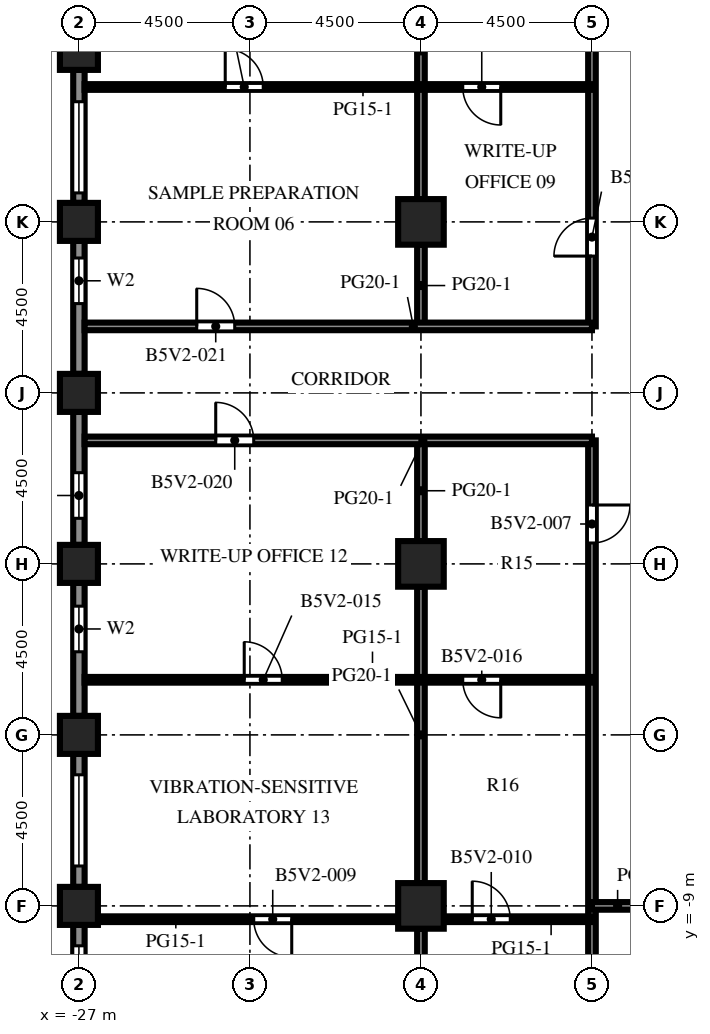
"""IFC4 building model, lengths in metres.
Left out: names, types, materials, properties, quantities, classifications, styles, units other than length and angle.
Written with IfcOpenShell. Run it as: python <this file> out.ifc"""

import sys

from ifc_helpers import new_model, si_unit, direction, frame, frame_2d, origin, origin_2d, place, context, subcontext, project, spatial, rectangle, extrude, element, fill, save


model = new_model("IFC4")
c1 = context("Model", 3, precision=1e-05, world=origin(), true_north=direction((0.0, 1.0)))
c2 = subcontext(c1, "Body", "Model", "MODEL_VIEW")
j1 = project(units=[si_unit("LENGTHUNIT", "METRE"), si_unit("PLANEANGLEUNIT", "RADIAN")], contexts=[c1])
p1 = place(None, origin())
s1 = spatial("IfcSite", under=j1, at=p1, CompositionType="ELEMENT")
p2 = place(p1, origin())
s2 = spatial("IfcBuilding", under=s1, at=p2, CompositionType="ELEMENT")
p3 = place(p2, frame((0.0, 0.0, 177.3)))
s3 = spatial("IfcBuildingStorey", under=s2, at=p3, CompositionType="ELEMENT", Elevation=177.3)
for number, where, z_axis, x_axis in (
    (1, (-27.0, -9.0, 0.0), (0.0, 0.0, 1.0), (1.0, 0.0, 0.0)),
    (2, (-27.0, -4.5, 0.0), (0.0, 0.0, 1.0), (1.0, 0.0, 0.0)),
    (3, (-27.0, 0.0, 0.0), (0.0, 0.0, 1.0), (1.0, 0.0, 0.0)),
    (4, (-27.0, 4.5, 0.0), (0.0, 0.0, 1.0), (1.0, 0.0, 0.0)),
    (5, (-27.0, 9.0, 0.0), (0.0, 0.0, 1.0), (1.0, 0.0, 0.0)),
    (6, (-27.0, 13.5, 0.0), (0.0, 0.0, 1.0), (1.0, 0.0, 0.0)),
):
    element("IfcColumn", number, at=place(p3, frame(where, z_axis=z_axis, x_axis=x_axis)), inside=s3, PredefinedType="COLUMN", context=c2, shape_type="SweptSolid", body=[
        extrude(rectangle(XDim=1.0, YDim=1.0, at=origin_2d()), origin(), (0.0, 0.0, 1.0), 4.1),
    ])
for number, where, z_axis, x_axis in (
    (7, (-18.0, -9.0, 0.0), (0.0, 0.0, 1.0), (1.0, 0.0, 0.0)),
    (8, (-18.0, 0.0, 0.0), (0.0, 0.0, 1.0), (1.0, 0.0, 0.0)),
    (9, (-18.0, 9.0, 0.0), (0.0, 0.0, 1.0), (1.0, 0.0, 0.0)),
):
    element("IfcColumn", number, at=place(p3, frame(where, z_axis=z_axis, x_axis=x_axis)), inside=s3, PredefinedType="COLUMN", context=c2, shape_type="SweptSolid", body=[
        extrude(rectangle(XDim=1.2, YDim=1.2, at=origin_2d()), origin(), (0.0, 0.0, 1.0), 4.1),
    ])
p4 = place(p3, frame((-27.0, 9.5, 0.0), z_axis=(0.0, 0.0, 1.0), x_axis=(0.0, 1.0, 0.0)))
e10 = element("IfcWall", 10, at=p4, inside=s3, PredefinedType="SOLIDWALL", context=c2, shape_type="SweptSolid", body=[
    extrude(rectangle(XDim=3.5, YDim=0.3, at=frame_2d((1.75, 0.0))), origin(), (0.0, 0.0, 1.0), 2.85),
])
p5 = place(p4, frame((0.262, 0.0, 0.8)))
e11 = element("IfcOpeningElement", 11, at=p5, cuts=e10, PredefinedType="OPENING", context=c2, shape_type="SweptSolid", body=[
    extrude(rectangle(XDim=2.4, YDim=1.7, at=frame_2d((1.2, 0.85))), frame((0.0, 0.16, 0.0), z_axis=(0.0, -1.0, 0.0), x_axis=(1.0, 0.0, 0.0)), (0.0, 0.0, 1.0), 0.32),
])
p6 = place(p3, frame((-27.0, 5.0, 0.0), z_axis=(0.0, 0.0, 1.0), x_axis=(0.0, 1.0, 0.0)))
e12 = element("IfcWall", 12, at=p6, inside=s3, PredefinedType="SOLIDWALL", context=c2, shape_type="SweptSolid", body=[
    extrude(rectangle(XDim=3.5, YDim=0.3, at=frame_2d((1.75, 0.0))), origin(), (0.0, 0.0, 1.0), 2.85),
])
p7 = place(p6, frame((1.85, 0.0, 0.8)))
e13 = element("IfcOpeningElement", 13, at=p7, cuts=e12, PredefinedType="OPENING", context=c2, shape_type="SweptSolid", body=[
    extrude(rectangle(XDim=1.2, YDim=1.7, at=frame_2d((0.6, 0.85))), frame((0.0, 0.16, 0.0), z_axis=(0.0, -1.0, 0.0), x_axis=(1.0, 0.0, 0.0)), (0.0, 0.0, 1.0), 0.32),
])
p8 = place(p3, frame((-27.0, 0.5, 0.0), z_axis=(0.0, 0.0, 1.0), x_axis=(0.0, 1.0, 0.0)))
e14 = element("IfcWall", 14, at=p8, inside=s3, PredefinedType="SOLIDWALL", context=c2, shape_type="SweptSolid", body=[
    extrude(rectangle(XDim=3.5, YDim=0.3, at=frame_2d((1.75, 0.0))), origin(), (0.0, 0.0, 1.0), 2.85),
])
p9 = place(p8, frame((0.7, 0.0, 0.8)))
e15 = element("IfcOpeningElement", 15, at=p9, cuts=e14, PredefinedType="OPENING", context=c2, shape_type="SweptSolid", body=[
    extrude(rectangle(XDim=1.2, YDim=1.7, at=frame_2d((0.6, 0.85))), frame((0.0, 0.16, 0.0), z_axis=(0.0, -1.0, 0.0), x_axis=(1.0, 0.0, 0.0)), (0.0, 0.0, 1.0), 0.32),
])
p10 = place(p3, frame((-27.0, -4.0, 0.0), z_axis=(0.0, 0.0, 1.0), x_axis=(0.0, 1.0, 0.0)))
e16 = element("IfcWall", 16, at=p10, inside=s3, PredefinedType="SOLIDWALL", context=c2, shape_type="SweptSolid", body=[
    extrude(rectangle(XDim=3.5, YDim=0.3, at=frame_2d((1.75, 0.0))), origin(), (0.0, 0.0, 1.0), 2.85),
])
p11 = place(p10, frame((1.688, 0.0, 0.8)))
e17 = element("IfcOpeningElement", 17, at=p11, cuts=e16, PredefinedType="OPENING", context=c2, shape_type="SweptSolid", body=[
    extrude(rectangle(XDim=1.2, YDim=1.7, at=frame_2d((0.6, 0.85))), frame((0.0, 0.16, 0.0), z_axis=(0.0, -1.0, 0.0), x_axis=(1.0, 0.0, 0.0)), (0.0, 0.0, 1.0), 0.32),
])
p12 = place(p3, frame((-27.0, -8.5, 0.0), z_axis=(0.0, 0.0, 1.0), x_axis=(0.0, 1.0, 0.0)))
e18 = element("IfcWall", 18, at=p12, inside=s3, PredefinedType="SOLIDWALL", context=c2, shape_type="SweptSolid", body=[
    extrude(rectangle(XDim=3.5, YDim=0.3, at=frame_2d((1.75, 0.0))), origin(), (0.0, 0.0, 1.0), 2.85),
])
p13 = place(p12, frame((0.55, 0.0, 0.8)))
e19 = element("IfcOpeningElement", 19, at=p13, cuts=e18, PredefinedType="OPENING", context=c2, shape_type="SweptSolid", body=[
    extrude(rectangle(XDim=2.4, YDim=1.7, at=frame_2d((1.2, 0.85))), frame((0.0, 0.16, 0.0), z_axis=(0.0, -1.0, 0.0), x_axis=(1.0, 0.0, 0.0)), (0.0, 0.0, 1.0), 0.32),
])
p14 = place(p3, frame((-27.0, -13.0, 0.0), z_axis=(0.0, 0.0, 1.0), x_axis=(0.0, 1.0, 0.0)))
e20 = element("IfcWall", 20, at=p14, inside=s3, PredefinedType="SOLIDWALL", context=c2, shape_type="SweptSolid", body=[
    extrude(rectangle(XDim=3.5, YDim=0.3, at=frame_2d((1.75, 0.0))), origin(), (0.0, 0.0, 1.0), 2.85),
])
p15 = place(p14, frame((0.55, 0.0, 0.8)))
e21 = element("IfcOpeningElement", 21, at=p15, cuts=e20, PredefinedType="OPENING", context=c2, shape_type="SweptSolid", body=[
    extrude(rectangle(XDim=2.4, YDim=1.7, at=frame_2d((1.2, 0.85))), frame((0.0, 0.16, 0.0), z_axis=(0.0, -1.0, 0.0), x_axis=(1.0, 0.0, 0.0)), (0.0, 0.0, 1.0), 0.32),
])
for number, where, z_axis, x_axis in (
    (22, (-18.0, -17.4, 0.0), (0.0, 0.0, 1.0), (0.0, 1.0, 0.0)),
    (23, (-18.0, -8.4, 0.0), (0.0, 0.0, 1.0), (0.0, 1.0, 0.0)),
):
    element("IfcWall", number, at=place(p3, frame(where, z_axis=z_axis, x_axis=x_axis)), inside=s3, PredefinedType="PARTITIONING", context=c2, shape_type="SweptSolid", body=[
        extrude(rectangle(XDim=7.8, YDim=0.2, at=frame_2d((3.9, 0.0))), origin(), (0.0, 0.0, 1.0), 3.65),
    ])
p16 = place(p3, frame((-18.0, 0.6, 0.0), z_axis=(0.0, 0.0, 1.0), x_axis=(0.0, 1.0, 0.0)))
e24 = element("IfcWall", 24, at=p16, inside=s3, PredefinedType="PARTITIONING", context=c2, shape_type="SweptSolid", body=[
    extrude(rectangle(XDim=2.65, YDim=0.2, at=frame_2d((1.325, 0.0))), origin(), (0.0, 0.0, 1.0), 3.65),
])
p17 = place(p3, frame((-18.0, 6.25, 0.0), z_axis=(0.0, 0.0, 1.0), x_axis=(0.0, 1.0, 0.0)))
e25 = element("IfcWall", 25, at=p17, inside=s3, PredefinedType="PARTITIONING", context=c2, shape_type="SweptSolid", body=[
    extrude(rectangle(XDim=2.15, YDim=0.2, at=frame_2d((1.075, 0.0))), origin(), (0.0, 0.0, 1.0), 3.65),
])
p18 = place(p3, frame((-18.0, 9.6, 0.0), z_axis=(0.0, 0.0, 1.0), x_axis=(0.0, 1.0, 0.0)))
e26 = element("IfcWall", 26, at=p18, inside=s3, PredefinedType="PARTITIONING", context=c2, shape_type="SweptSolid", body=[
    extrude(rectangle(XDim=7.8, YDim=0.2, at=frame_2d((3.9, 0.0))), origin(), (0.0, 0.0, 1.0), 3.65),
])
p19 = place(p3, frame((-13.5, -26.5, 0.0), z_axis=(0.0, 0.0, 1.0), x_axis=(0.0, 1.0, 0.0)))
e27 = element("IfcWall", 27, at=p19, inside=s3, PredefinedType="PARTITIONING", context=c2, shape_type="SweptSolid", body=[
    extrude(rectangle(XDim=29.75, YDim=0.2, at=frame_2d((14.875, 0.0))), origin(), (0.0, 0.0, 1.0), 3.65),
])
p20 = place(p19, frame((27.05, 0.0, 0.0)))
e28 = element("IfcOpeningElement", 28, at=p20, cuts=e27, PredefinedType="OPENING", context=c2, shape_type="SweptSolid", body=[
    extrude(rectangle(XDim=1.0, YDim=2.1, at=frame_2d((0.5, 1.05))), frame((0.0, 0.11, 0.0), z_axis=(0.0, -1.0, 0.0), x_axis=(1.0, 0.0, 0.0)), (0.0, 0.0, 1.0), 0.22),
])
p21 = place(p3, frame((-13.5, 6.25, 0.0), z_axis=(0.0, 0.0, 1.0), x_axis=(0.0, 1.0, 0.0)))
e29 = element("IfcWall", 29, at=p21, inside=s3, PredefinedType="PARTITIONING", context=c2, shape_type="SweptSolid", body=[
    extrude(rectangle(XDim=20.25, YDim=0.2, at=frame_2d((10.125, 0.0))), origin(), (0.0, 0.0, 1.0), 3.65),
])
p22 = place(p21, frame((1.85, 0.0, 0.0)))
e30 = element("IfcOpeningElement", 30, at=p22, cuts=e29, PredefinedType="OPENING", context=c2, shape_type="SweptSolid", body=[
    extrude(rectangle(XDim=1.0, YDim=2.1, at=frame_2d((0.5, 1.05))), frame((0.0, 0.11, 0.0), z_axis=(0.0, -1.0, 0.0), x_axis=(1.0, 0.0, 0.0)), (0.0, 0.0, 1.0), 0.22),
])
p23 = place(p3, frame((-18.6, -9.35, 0.0), z_axis=(0.0, 0.0, 1.0), x_axis=(-1.0, 0.0, 0.0)))
e31 = element("IfcWall", 31, at=p23, inside=s3, PredefinedType="PARTITIONING", context=c2, shape_type="SweptSolid", body=[
    extrude(rectangle(XDim=7.9, YDim=0.15, at=frame_2d((3.95, 0.0))), origin(), (0.0, 0.0, 1.0), 3.65),
])
p24 = place(p23, frame((2.8, 0.0, 0.0)))
e32 = element("IfcOpeningElement", 32, at=p24, cuts=e31, PredefinedType="OPENING", context=c2, shape_type="SweptSolid", body=[
    extrude(rectangle(XDim=1.0, YDim=2.1, at=frame_2d((0.5, 1.05))), frame((0.0, 0.085, 0.0), z_axis=(0.0, -1.0, 0.0), x_axis=(1.0, 0.0, 0.0)), (0.0, 0.0, 1.0), 0.17),
])
p25 = place(p3, frame((-13.5, -9.35, 0.0), z_axis=(0.0, 0.0, 1.0), x_axis=(-1.0, 0.0, 0.0)))
e33 = element("IfcWall", 33, at=p25, inside=s3, PredefinedType="PARTITIONING", context=c2, shape_type="SweptSolid", body=[
    extrude(rectangle(XDim=3.9, YDim=0.15, at=frame_2d((1.95, 0.0))), origin(), (0.0, 0.0, 1.0), 3.65),
])
p26 = place(p25, frame((2.15, 0.0, 0.0)))
e34 = element("IfcOpeningElement", 34, at=p26, cuts=e33, PredefinedType="OPENING", context=c2, shape_type="SweptSolid", body=[
    extrude(rectangle(XDim=1.0, YDim=2.1, at=frame_2d((0.5, 1.05))), frame((0.0, 0.085, 0.0), z_axis=(0.0, -1.0, 0.0), x_axis=(1.0, 0.0, 0.0)), (0.0, 0.0, 1.0), 0.17),
])
p27 = place(p3, frame((-10.5, -9.0, 0.0), z_axis=(0.0, 0.0, 1.0), x_axis=(-1.0, 0.0, 0.0)))
e35 = element("IfcWall", 35, at=p27, inside=s3, PredefinedType="PARTITIONING", context=c2, shape_type="SweptSolid", body=[
    extrude(rectangle(XDim=3.0, YDim=0.2, at=frame_2d((1.5, 0.0))), origin(), (0.0, 0.0, 1.0), 3.65),
])
p28 = place(p27, frame((0.65, 0.0, 0.0)))
e36 = element("IfcOpeningElement", 36, at=p28, cuts=e35, PredefinedType="OPENING", context=c2, shape_type="SweptSolid", body=[
    extrude(rectangle(XDim=1.0, YDim=2.1, at=frame_2d((0.5, 1.05))), frame((0.0, 0.11, 0.0), z_axis=(0.0, -1.0, 0.0), x_axis=(1.0, 0.0, 0.0)), (0.0, 0.0, 1.0), 0.22),
])
p29 = place(p3, frame((-13.5, -3.05, 0.0), z_axis=(0.0, 0.0, 1.0), x_axis=(-1.0, 0.0, 0.0)))
e37 = element("IfcWall", 37, at=p29, inside=s3, PredefinedType="PARTITIONING", context=c2, shape_type="SweptSolid", body=[
    extrude(rectangle(XDim=13.35, YDim=0.15, at=frame_2d((6.675, 0.0))), origin(), (0.0, 0.0, 1.0), 3.65),
])
p30 = place(p29, frame((8.15, 0.0, 0.0)))
e38 = element("IfcOpeningElement", 38, at=p30, cuts=e37, PredefinedType="OPENING", context=c2, shape_type="SweptSolid", body=[
    extrude(rectangle(XDim=1.0, YDim=2.1, at=frame_2d((0.5, 1.05))), frame((0.0, 0.085, 0.0), z_axis=(0.0, -1.0, 0.0), x_axis=(1.0, 0.0, 0.0)), (0.0, 0.0, 1.0), 0.17),
])
p31 = place(p29, frame((2.4, 0.0, 0.0)))
e39 = element("IfcOpeningElement", 39, at=p31, cuts=e37, PredefinedType="OPENING", context=c2, shape_type="SweptSolid", body=[
    extrude(rectangle(XDim=1.0, YDim=2.1, at=frame_2d((0.5, 1.05))), frame((0.0, 0.085, 0.0), z_axis=(0.0, -1.0, 0.0), x_axis=(1.0, 0.0, 0.0)), (0.0, 0.0, 1.0), 0.17),
])
p32 = place(p3, frame((-13.5, 3.25, 0.0), z_axis=(0.0, 0.0, 1.0), x_axis=(-1.0, 0.0, 0.0)))
e40 = element("IfcWall", 40, at=p32, inside=s3, PredefinedType="PARTITIONING", context=c2, shape_type="SweptSolid", body=[
    extrude(rectangle(XDim=13.35, YDim=0.2, at=frame_2d((6.675, 0.0))), origin(), (0.0, 0.0, 1.0), 3.65),
])
p33 = place(p32, frame((8.9, 0.0, 0.0)))
e41 = element("IfcOpeningElement", 41, at=p33, cuts=e40, PredefinedType="OPENING", context=c2, shape_type="SweptSolid", body=[
    extrude(rectangle(XDim=1.0, YDim=2.1, at=frame_2d((0.5, 1.05))), frame((0.0, 0.11, 0.0), z_axis=(0.0, -1.0, 0.0), x_axis=(1.0, 0.0, 0.0)), (0.0, 0.0, 1.0), 0.22),
])
p34 = place(p3, frame((-26.85, 6.25, 0.0), z_axis=(0.0, 0.0, 1.0), x_axis=(1.0, 0.0, 0.0)))
e42 = element("IfcWall", 42, at=p34, inside=s3, PredefinedType="PARTITIONING", context=c2, shape_type="SweptSolid", body=[
    extrude(rectangle(XDim=13.35, YDim=0.2, at=frame_2d((6.675, 0.0))), origin(), (0.0, 0.0, 1.0), 3.65),
])
p35 = place(p34, frame((2.95, 0.0, 0.0)))
e43 = element("IfcOpeningElement", 43, at=p35, cuts=e42, PredefinedType="OPENING", context=c2, shape_type="SweptSolid", body=[
    extrude(rectangle(XDim=1.0, YDim=2.1, at=frame_2d((0.5, 1.05))), frame((0.0, 0.11, 0.0), z_axis=(0.0, -1.0, 0.0), x_axis=(1.0, 0.0, 0.0)), (0.0, 0.0, 1.0), 0.22),
])
p36 = place(p3, frame((-26.85, 12.55, 0.0), z_axis=(0.0, 0.0, 1.0), x_axis=(1.0, 0.0, 0.0)))
e44 = element("IfcWall", 44, at=p36, inside=s3, PredefinedType="PARTITIONING", context=c2, shape_type="SweptSolid", body=[
    extrude(rectangle(XDim=13.35, YDim=0.15, at=frame_2d((6.675, 0.0))), origin(), (0.0, 0.0, 1.0), 3.65),
])
p37 = place(p36, frame((3.7, 0.0, 0.0)))
e45 = element("IfcOpeningElement", 45, at=p37, cuts=e44, PredefinedType="OPENING", context=c2, shape_type="SweptSolid", body=[
    extrude(rectangle(XDim=1.0, YDim=2.1, at=frame_2d((0.5, 1.05))), frame((0.0, 0.085, 0.0), z_axis=(0.0, -1.0, 0.0), x_axis=(1.0, 0.0, 0.0)), (0.0, 0.0, 1.0), 0.17),
])
p38 = place(p36, frame((9.95, 0.0, 0.0)))
e46 = element("IfcOpeningElement", 46, at=p38, cuts=e44, PredefinedType="OPENING", context=c2, shape_type="SweptSolid", body=[
    extrude(rectangle(XDim=1.0, YDim=2.1, at=frame_2d((0.5, 1.05))), frame((0.0, 0.085, 0.0), z_axis=(0.0, -1.0, 0.0), x_axis=(1.0, 0.0, 0.0)), (0.0, 0.0, 1.0), 0.17),
])
p39 = place(p5, origin())
e47 = element("IfcWindow", 47, at=p39, inside=s3, PartitioningType="SINGLE_PANEL", PredefinedType="WINDOW", context=c2, shape_type="SweptSolid", body=[
    extrude(rectangle(XDim=2.4, YDim=1.7, at=frame_2d((1.2, 0.85))), frame((0.0, 0.03, 0.0), z_axis=(0.0, -1.0, 0.0), x_axis=(1.0, 0.0, 0.0)), (0.0, 0.0, 1.0), 0.06),
])
fill(e11, e47)
p40 = place(p7, origin())
e48 = element("IfcWindow", 48, at=p40, inside=s3, PartitioningType="SINGLE_PANEL", PredefinedType="WINDOW", context=c2, shape_type="SweptSolid", body=[
    extrude(rectangle(XDim=1.2, YDim=1.7, at=frame_2d((0.6, 0.85))), frame((0.0, 0.03, 0.0), z_axis=(0.0, -1.0, 0.0), x_axis=(1.0, 0.0, 0.0)), (0.0, 0.0, 1.0), 0.06),
])
fill(e13, e48)
p41 = place(p9, origin())
e49 = element("IfcWindow", 49, at=p41, inside=s3, PartitioningType="SINGLE_PANEL", PredefinedType="WINDOW", context=c2, shape_type="SweptSolid", body=[
    extrude(rectangle(XDim=1.2, YDim=1.7, at=frame_2d((0.6, 0.85))), frame((0.0, 0.03, 0.0), z_axis=(0.0, -1.0, 0.0), x_axis=(1.0, 0.0, 0.0)), (0.0, 0.0, 1.0), 0.06),
])
fill(e15, e49)
p42 = place(p11, origin())
e50 = element("IfcWindow", 50, at=p42, inside=s3, PartitioningType="SINGLE_PANEL", PredefinedType="WINDOW", context=c2, shape_type="SweptSolid", body=[
    extrude(rectangle(XDim=1.2, YDim=1.7, at=frame_2d((0.6, 0.85))), frame((0.0, 0.03, 0.0), z_axis=(0.0, -1.0, 0.0), x_axis=(1.0, 0.0, 0.0)), (0.0, 0.0, 1.0), 0.06),
])
fill(e17, e50)
p43 = place(p13, origin())
e51 = element("IfcWindow", 51, at=p43, inside=s3, PartitioningType="SINGLE_PANEL", PredefinedType="WINDOW", context=c2, shape_type="SweptSolid", body=[
    extrude(rectangle(XDim=2.4, YDim=1.7, at=frame_2d((1.2, 0.85))), frame((0.0, 0.03, 0.0), z_axis=(0.0, -1.0, 0.0), x_axis=(1.0, 0.0, 0.0)), (0.0, 0.0, 1.0), 0.06),
])
fill(e19, e51)
p44 = place(p15, origin())
e52 = element("IfcWindow", 52, at=p44, inside=s3, PartitioningType="SINGLE_PANEL", PredefinedType="WINDOW", context=c2, shape_type="SweptSolid", body=[
    extrude(rectangle(XDim=2.4, YDim=1.7, at=frame_2d((1.2, 0.85))), frame((0.0, 0.03, 0.0), z_axis=(0.0, -1.0, 0.0), x_axis=(1.0, 0.0, 0.0)), (0.0, 0.0, 1.0), 0.06),
])
fill(e21, e52)
p45 = place(p20, origin())
e53 = element("IfcDoor", 53, at=p45, inside=s3, OperationType="SINGLE_SWING_RIGHT", PredefinedType="DOOR", context=c2, shape_type="SweptSolid", body=[
    extrude(rectangle(XDim=1.0, YDim=2.1, at=frame_2d((0.5, 1.05))), frame((0.0, 0.025, 0.0), z_axis=(0.0, -1.0, 0.0), x_axis=(1.0, 0.0, 0.0)), (0.0, 0.0, 1.0), 0.05),
])
fill(e28, e53)
p46 = place(p22, origin())
e54 = element("IfcDoor", 54, at=p46, inside=s3, OperationType="SINGLE_SWING_LEFT", PredefinedType="DOOR", context=c2, shape_type="SweptSolid", body=[
    extrude(rectangle(XDim=1.0, YDim=2.1, at=frame_2d((0.5, 1.05))), frame((0.0, 0.025, 0.0), z_axis=(0.0, -1.0, 0.0), x_axis=(1.0, 0.0, 0.0)), (0.0, 0.0, 1.0), 0.05),
])
fill(e30, e54)
p47 = place(p24, origin())
e55 = element("IfcDoor", 55, at=p47, inside=s3, OperationType="SINGLE_SWING_LEFT", PredefinedType="DOOR", context=c2, shape_type="SweptSolid", body=[
    extrude(rectangle(XDim=1.0, YDim=2.1, at=frame_2d((0.5, 1.05))), frame((0.0, 0.025, 0.0), z_axis=(0.0, -1.0, 0.0), x_axis=(1.0, 0.0, 0.0)), (0.0, 0.0, 1.0), 0.05),
])
fill(e32, e55)
p48 = place(p26, origin())
e56 = element("IfcDoor", 56, at=p48, inside=s3, OperationType="SINGLE_SWING_RIGHT", PredefinedType="DOOR", context=c2, shape_type="SweptSolid", body=[
    extrude(rectangle(XDim=1.0, YDim=2.1, at=frame_2d((0.5, 1.05))), frame((0.0, 0.025, 0.0), z_axis=(0.0, -1.0, 0.0), x_axis=(1.0, 0.0, 0.0)), (0.0, 0.0, 1.0), 0.05),
])
fill(e34, e56)
p49 = place(p30, origin())
e57 = element("IfcDoor", 57, at=p49, inside=s3, OperationType="SINGLE_SWING_RIGHT", PredefinedType="DOOR", context=c2, shape_type="SweptSolid", body=[
    extrude(rectangle(XDim=1.0, YDim=2.1, at=frame_2d((0.5, 1.05))), frame((0.0, 0.025, 0.0), z_axis=(0.0, -1.0, 0.0), x_axis=(1.0, 0.0, 0.0)), (0.0, 0.0, 1.0), 0.05),
])
fill(e38, e57)
p50 = place(p31, origin())
e58 = element("IfcDoor", 58, at=p50, inside=s3, OperationType="SINGLE_SWING_LEFT", PredefinedType="DOOR", context=c2, shape_type="SweptSolid", body=[
    extrude(rectangle(XDim=1.0, YDim=2.1, at=frame_2d((0.5, 1.05))), frame((0.0, 0.025, 0.0), z_axis=(0.0, -1.0, 0.0), x_axis=(1.0, 0.0, 0.0)), (0.0, 0.0, 1.0), 0.05),
])
fill(e39, e58)
p51 = place(p33, origin())
e59 = element("IfcDoor", 59, at=p51, inside=s3, OperationType="SINGLE_SWING_RIGHT", PredefinedType="DOOR", context=c2, shape_type="SweptSolid", body=[
    extrude(rectangle(XDim=1.0, YDim=2.1, at=frame_2d((0.5, 1.05))), frame((0.0, 0.025, 0.0), z_axis=(0.0, -1.0, 0.0), x_axis=(1.0, 0.0, 0.0)), (0.0, 0.0, 1.0), 0.05),
])
fill(e41, e59)
p52 = place(p35, origin())
e60 = element("IfcDoor", 60, at=p52, inside=s3, OperationType="SINGLE_SWING_LEFT", PredefinedType="DOOR", context=c2, shape_type="SweptSolid", body=[
    extrude(rectangle(XDim=1.0, YDim=2.1, at=frame_2d((0.5, 1.05))), frame((0.0, 0.025, 0.0), z_axis=(0.0, -1.0, 0.0), x_axis=(1.0, 0.0, 0.0)), (0.0, 0.0, 1.0), 0.05),
])
fill(e43, e60)
p53 = place(p37, origin())
e61 = element("IfcDoor", 61, at=p53, inside=s3, OperationType="SINGLE_SWING_LEFT", PredefinedType="DOOR", context=c2, shape_type="SweptSolid", body=[
    extrude(rectangle(XDim=1.0, YDim=2.1, at=frame_2d((0.5, 1.05))), frame((0.0, 0.025, 0.0), z_axis=(0.0, -1.0, 0.0), x_axis=(1.0, 0.0, 0.0)), (0.0, 0.0, 1.0), 0.05),
])
fill(e45, e61)
p54 = place(p38, origin())
e62 = element("IfcDoor", 62, at=p54, inside=s3, OperationType="SINGLE_SWING_RIGHT", PredefinedType="DOOR", context=c2, shape_type="SweptSolid", body=[
    extrude(rectangle(XDim=1.0, YDim=2.1, at=frame_2d((0.5, 1.05))), frame((0.0, 0.025, 0.0), z_axis=(0.0, -1.0, 0.0), x_axis=(1.0, 0.0, 0.0)), (0.0, 0.0, 1.0), 0.05),
])
fill(e46, e62)
save(model, sys.argv[1])
